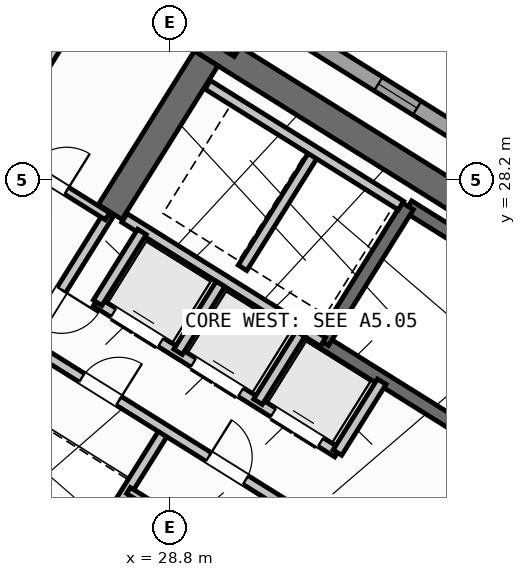
"""IFC4 building model, lengths in metres.
Left out: names, types, materials, properties, quantities, classifications, styles, units other than length and angle.
Written with IfcOpenShell. Run it as: python <this file> out.ifc"""

import sys

from ifc_helpers import new_model, si_unit, direction, frame, frame_2d, origin, origin_2d, place, context, subcontext, project, spatial, rectangle, hollow_rectangle, extrude, source, transform, mapped, element, fill, save


model = new_model("IFC4")
c1 = context("Model", 3, precision=1e-05, world=origin(), true_north=direction((0.0, 1.0)))
c2 = subcontext(c1, "Body", "Model", "MODEL_VIEW")
j1 = project(units=[si_unit("LENGTHUNIT", "METRE"), si_unit("PLANEANGLEUNIT", "RADIAN")], contexts=[c1])
p1 = place(None, origin())
s1 = spatial("IfcSite", under=j1, at=p1, CompositionType="ELEMENT")
p2 = place(p1, origin())
s2 = spatial("IfcBuilding", under=s1, at=p2, CompositionType="ELEMENT")
p3 = place(p2, frame((0.0, 0.0, 147.9)))
s3 = spatial("IfcBuildingStorey", under=s2, at=p3, CompositionType="ELEMENT", Elevation=147.9)
p4 = place(p3, frame((40.573, 24.01, 0.0), z_axis=(0.0, 0.0, 1.0), x_axis=(-0.848047359947, 0.529920442413, 0.0)))
e1 = element("IfcWall", 1, at=p4, inside=s3, PredefinedType="SHEAR", context=c2, shape_type="SweptSolid", body=[
    extrude(rectangle(XDim=13.14, YDim=0.55, at=frame_2d((6.57, 0.0))), origin(), (0.0, 0.0, 1.0), 3.35),
])
p5 = place(p3, frame((29.517, 30.594, 0.0), z_axis=(0.0, 0.0, 1.0), x_axis=(-0.529906864564, -0.848055844204, 0.0)))
e2 = element("IfcWall", 2, at=p5, inside=s3, PredefinedType="SHEAR", context=c2, shape_type="SweptSolid", body=[
    extrude(rectangle(XDim=3.575, YDim=0.55, at=frame_2d((1.788, 0.0))), origin(), (0.0, 0.0, 1.0), 3.35),
])
m1 = source(origin(), c2, "Body", "SweptSolid", [
    extrude(hollow_rectangle(XDim=0.9, YDim=0.9, WallThickness=0.036, at=origin_2d()), origin(), (0.0, 0.0, 1.0), 3.6),
])
p6 = place(p3, frame((29.928, 31.251, 0.0), z_axis=(0.0, 0.0, 1.0), x_axis=(-0.848048096156, 0.529919264233, 0.0)))
e3 = element("IfcColumn", 3, at=p6, inside=s3, PredefinedType="COLUMN", context=c2, shape_type="MappedRepresentation", body=[
    mapped(m1, transform((0.0, 0.0, 0.0), scale=1.0)),
])
p7 = place(p3, frame((29.268, 6.429, 0.0), z_axis=(0.0, 0.0, 1.0), x_axis=(-0.848049971435, 0.529916263149, 0.0)))
e4 = element("IfcWall", 4, at=p7, inside=s3, PredefinedType="STANDARD", context=c2, shape_type="SweptSolid", body=[
    extrude(rectangle(XDim=31.588, YDim=0.32, at=frame_2d((15.794, 0.0))), origin(), (0.0, 0.0, 1.0), 3.35),
])
p8 = place(p7, frame((16.362, 0.0, 0.0)))
e5 = element("IfcOpeningElement", 5, at=p8, cuts=e4, PredefinedType="OPENING", context=c2, shape_type="SweptSolid", body=[
    extrude(rectangle(XDim=1.2, YDim=2.15, at=frame_2d((0.6, 1.075))), frame((0.0, 0.17, 0.0), z_axis=(0.0, -1.0, 0.0), x_axis=(1.0, 0.0, 0.0)), (0.0, 0.0, 1.0), 0.34),
])
p9 = place(p7, frame((2.989, 0.0, 0.8)))
e6 = element("IfcOpeningElement", 6, at=p9, cuts=e4, PredefinedType="OPENING", context=c2, shape_type="SweptSolid", body=[
    extrude(rectangle(XDim=2.1, YDim=1.55, at=frame_2d((1.05, 0.775))), frame((0.0, 0.17, 0.0), z_axis=(0.0, -1.0, 0.0), x_axis=(1.0, 0.0, 0.0)), (0.0, 0.0, 1.0), 0.34),
])
p10 = place(p7, frame((8.359, 0.0, 0.8)))
e7 = element("IfcOpeningElement", 7, at=p10, cuts=e4, PredefinedType="OPENING", context=c2, shape_type="SweptSolid", body=[
    extrude(rectangle(XDim=2.1, YDim=1.55, at=frame_2d((1.05, 0.775))), frame((0.0, 0.17, 0.0), z_axis=(0.0, -1.0, 0.0), x_axis=(1.0, 0.0, 0.0)), (0.0, 0.0, 1.0), 0.34),
])
p11 = place(p7, frame((13.284, 0.0, 0.95)))
e8 = element("IfcOpeningElement", 8, at=p11, cuts=e4, PredefinedType="OPENING", context=c2, shape_type="SweptSolid", body=[
    extrude(rectangle(XDim=1.2, YDim=1.4, at=frame_2d((0.6, 0.7))), frame((0.0, 0.17, 0.0), z_axis=(0.0, -1.0, 0.0), x_axis=(1.0, 0.0, 0.0)), (0.0, 0.0, 1.0), 0.34),
])
p12 = place(p7, frame((29.188, 0.0, 0.95)))
e9 = element("IfcOpeningElement", 9, at=p12, cuts=e4, PredefinedType="OPENING", context=c2, shape_type="SweptSolid", body=[
    extrude(rectangle(XDim=1.2, YDim=1.4, at=frame_2d((0.6, 0.7))), frame((0.0, 0.17, 0.0), z_axis=(0.0, -1.0, 0.0), x_axis=(1.0, 0.0, 0.0)), (0.0, 0.0, 1.0), 0.34),
])
p13 = place(p7, frame((19.674, 0.0, 1.0)))
e10 = element("IfcOpeningElement", 10, at=p13, cuts=e4, PredefinedType="OPENING", context=c2, shape_type="SweptSolid", body=[
    extrude(rectangle(XDim=0.9, YDim=1.25, at=frame_2d((0.45, 0.625))), frame((0.0, 0.17, 0.0), z_axis=(0.0, -1.0, 0.0), x_axis=(1.0, 0.0, 0.0)), (0.0, 0.0, 1.0), 0.34),
])
p14 = place(p7, frame((21.896, 0.0, 1.0)))
e11 = element("IfcOpeningElement", 11, at=p14, cuts=e4, PredefinedType="OPENING", context=c2, shape_type="SweptSolid", body=[
    extrude(rectangle(XDim=0.9, YDim=1.25, at=frame_2d((0.45, 0.625))), frame((0.0, 0.17, 0.0), z_axis=(0.0, -1.0, 0.0), x_axis=(1.0, 0.0, 0.0)), (0.0, 0.0, 1.0), 0.34),
])
p15 = place(p7, frame((24.106, 0.0, 1.0)))
e12 = element("IfcOpeningElement", 12, at=p15, cuts=e4, PredefinedType="OPENING", context=c2, shape_type="SweptSolid", body=[
    extrude(rectangle(XDim=0.65, YDim=1.15, at=frame_2d((0.325, 0.575))), frame((0.0, 0.17, 0.0), z_axis=(0.0, -1.0, 0.0), x_axis=(1.0, 0.0, 0.0)), (0.0, 0.0, 1.0), 0.34),
])
p16 = place(p7, frame((26.366, 0.0, 1.0)))
e13 = element("IfcOpeningElement", 13, at=p16, cuts=e4, PredefinedType="OPENING", context=c2, shape_type="SweptSolid", body=[
    extrude(rectangle(XDim=0.9, YDim=1.25, at=frame_2d((0.45, 0.625))), frame((0.0, 0.17, 0.0), z_axis=(0.0, -1.0, 0.0), x_axis=(1.0, 0.0, 0.0)), (0.0, 0.0, 1.0), 0.34),
])
p17 = place(p3, frame((14.138, 41.825, 0.0), z_axis=(0.0, 0.0, 1.0), x_axis=(0.848046498049, -0.529921821731, 0.0)))
e14 = element("IfcWall", 14, at=p17, inside=s3, PredefinedType="STANDARD", context=c2, shape_type="SweptSolid", body=[
    extrude(rectangle(XDim=31.588, YDim=0.32, at=frame_2d((15.794, 0.0))), origin(), (0.0, 0.0, 1.0), 3.35),
])
p18 = place(p17, frame((2.949, 0.0, 0.0)))
e15 = element("IfcOpeningElement", 15, at=p18, cuts=e14, PredefinedType="OPENING", context=c2, shape_type="SweptSolid", body=[
    extrude(rectangle(XDim=1.05, YDim=2.15, at=frame_2d((0.525, 1.075))), frame((0.0, 0.17, 0.0), z_axis=(0.0, -1.0, 0.0), x_axis=(1.0, 0.0, 0.0)), (0.0, 0.0, 1.0), 0.34),
])
p19 = place(p17, frame((0.861, 0.0, 0.85)))
e16 = element("IfcOpeningElement", 16, at=p19, cuts=e14, PredefinedType="OPENING", context=c2, shape_type="SweptSolid", body=[
    extrude(rectangle(XDim=1.5, YDim=1.5, at=frame_2d((0.75, 0.75))), frame((0.0, 0.17, 0.0), z_axis=(0.0, -1.0, 0.0), x_axis=(1.0, 0.0, 0.0)), (0.0, 0.0, 1.0), 0.34),
])
p20 = place(p17, frame((8.494, 0.0, 0.85)))
e17 = element("IfcOpeningElement", 17, at=p20, cuts=e14, PredefinedType="OPENING", context=c2, shape_type="SweptSolid", body=[
    extrude(rectangle(XDim=1.8, YDim=1.5, at=frame_2d((0.9, 0.75))), frame((0.0, 0.17, 0.0), z_axis=(0.0, -1.0, 0.0), x_axis=(1.0, 0.0, 0.0)), (0.0, 0.0, 1.0), 0.34),
])
p21 = place(p17, frame((13.874, 0.0, 0.85)))
e18 = element("IfcOpeningElement", 18, at=p21, cuts=e14, PredefinedType="OPENING", context=c2, shape_type="SweptSolid", body=[
    extrude(rectangle(XDim=1.5, YDim=1.5, at=frame_2d((0.75, 0.75))), frame((0.0, 0.17, 0.0), z_axis=(0.0, -1.0, 0.0), x_axis=(1.0, 0.0, 0.0)), (0.0, 0.0, 1.0), 0.34),
])
p22 = place(p17, frame((17.104, 0.0, 1.0)))
e19 = element("IfcOpeningElement", 19, at=p22, cuts=e14, PredefinedType="OPENING", context=c2, shape_type="SweptSolid", body=[
    extrude(rectangle(XDim=0.9, YDim=1.25, at=frame_2d((0.45, 0.625))), frame((0.0, 0.17, 0.0), z_axis=(0.0, -1.0, 0.0), x_axis=(1.0, 0.0, 0.0)), (0.0, 0.0, 1.0), 0.34),
])
p23 = place(p17, frame((22.144, 0.0, 1.0)))
e20 = element("IfcOpeningElement", 20, at=p23, cuts=e14, PredefinedType="OPENING", context=c2, shape_type="SweptSolid", body=[
    extrude(rectangle(XDim=0.9, YDim=1.25, at=frame_2d((0.45, 0.625))), frame((0.0, 0.17, 0.0), z_axis=(0.0, -1.0, 0.0), x_axis=(1.0, 0.0, 0.0)), (0.0, 0.0, 1.0), 0.34),
])
p24 = place(p17, frame((27.744, 0.0, 1.0)))
e21 = element("IfcOpeningElement", 21, at=p24, cuts=e14, PredefinedType="OPENING", context=c2, shape_type="SweptSolid", body=[
    extrude(rectangle(XDim=0.9, YDim=1.25, at=frame_2d((0.45, 0.625))), frame((0.0, 0.17, 0.0), z_axis=(0.0, -1.0, 0.0), x_axis=(1.0, 0.0, 0.0)), (0.0, 0.0, 1.0), 0.34),
])
p25 = place(p3, frame((31.28, 18.261, 0.0), z_axis=(0.0, 0.0, 1.0), x_axis=(-0.848051618787, 0.529913626805, 0.0)))
e22 = element("IfcWall", 22, at=p25, inside=s3, PredefinedType="SHEAR", context=c2, shape_type="SweptSolid", body=[
    extrude(rectangle(XDim=7.46, YDim=0.26, at=frame_2d((3.73, 0.0))), origin(), (0.0, 0.0, 1.0), 3.35),
])
p26 = place(p25, frame((0.36, 0.0, 0.0)))
e23 = element("IfcOpeningElement", 23, at=p26, cuts=e22, PredefinedType="OPENING", context=c2, shape_type="SweptSolid", body=[
    extrude(rectangle(XDim=0.86, YDim=2.05, at=frame_2d((0.43, 1.025))), frame((0.0, 0.14, 0.0), z_axis=(0.0, -1.0, 0.0), x_axis=(1.0, 0.0, 0.0)), (0.0, 0.0, 1.0), 0.28),
])
p27 = place(p3, frame((39.721, 23.788, 0.0), z_axis=(0.0, 0.0, 1.0), x_axis=(-0.848054434086, 0.529909121291, 0.0)))
e24 = element("IfcWall", 24, at=p27, inside=s3, PredefinedType="SHEAR", context=c2, shape_type="SweptSolid", body=[
    extrude(rectangle(XDim=7.33, YDim=0.26, at=frame_2d((3.665, 0.0))), origin(), (0.0, 0.0, 1.0), 3.35),
])
p28 = place(p3, frame((38.046, 21.108, 0.0), z_axis=(0.0, 0.0, 1.0), x_axis=(-0.848054434086, 0.529909121291, 0.0)))
e25 = element("IfcWall", 25, at=p28, inside=s3, PredefinedType="SHEAR", context=c2, shape_type="SweptSolid", body=[
    extrude(rectangle(XDim=7.33, YDim=0.26, at=frame_2d((3.665, 0.0))), origin(), (0.0, 0.0, 1.0), 3.35),
])
p29 = place(p28, frame((0.22, 0.0, 0.0)))
e26 = element("IfcOpeningElement", 26, at=p29, cuts=e25, PredefinedType="OPENING", context=c2, shape_type="SweptSolid", body=[
    extrude(rectangle(XDim=1.1, YDim=2.1, at=frame_2d((0.55, 1.05))), frame((0.0, 0.14, 0.0), z_axis=(0.0, -1.0, 0.0), x_axis=(1.0, 0.0, 0.0)), (0.0, 0.0, 1.0), 0.28),
])
p30 = place(p3, frame((33.496, 27.677, 0.0), z_axis=(0.0, 0.0, 1.0), x_axis=(-0.529908658664, -0.84805472316, 0.0)))
e27 = element("IfcWall", 27, at=p30, inside=s3, PredefinedType="SHEAR", context=c2, shape_type="SweptSolid", body=[
    extrude(rectangle(XDim=3.16, YDim=0.26, at=frame_2d((1.58, 0.0))), origin(), (0.0, 0.0, 1.0), 3.35),
])
p31 = place(p3, frame((31.822, 24.998, 0.0), z_axis=(0.0, 0.0, 1.0), x_axis=(-0.848036912365, 0.52993716162, 0.0)))
e28 = element("IfcWall", 28, at=p31, inside=s3, PredefinedType="STANDARD", context=c2, shape_type="SweptSolid", body=[
    extrude(rectangle(XDim=4.618, YDim=0.2, at=frame_2d((2.309, 0.0))), origin(), (0.0, 0.0, 1.0), 3.34),
])
p32 = place(p3, frame((32.108, 22.814, 0.0), z_axis=(0.0, 0.0, 1.0), x_axis=(-0.848042229521, 0.529928652696, 0.0)))
e29 = element("IfcWall", 29, at=p32, inside=s3, PredefinedType="STANDARD", context=c2, shape_type="SweptSolid", body=[
    extrude(rectangle(XDim=5.62, YDim=0.2, at=frame_2d((2.81, 0.0))), origin(), (0.0, 0.0, 1.0), 3.34),
])
p33 = place(p32, frame((0.39, 0.0, 0.0)))
e30 = element("IfcOpeningElement", 30, at=p33, cuts=e29, PredefinedType="OPENING", context=c2, shape_type="SweptSolid", body=[
    extrude(rectangle(XDim=1.1, YDim=2.15, at=frame_2d((0.55, 1.075))), frame((0.0, 0.11, 0.0), z_axis=(0.0, -1.0, 0.0), x_axis=(1.0, 0.0, 0.0)), (0.0, 0.0, 1.0), 0.22),
])
p34 = place(p32, frame((2.25, 0.0, 0.0)))
e31 = element("IfcOpeningElement", 31, at=p34, cuts=e29, PredefinedType="OPENING", context=c2, shape_type="SweptSolid", body=[
    extrude(rectangle(XDim=1.1, YDim=2.15, at=frame_2d((0.55, 1.075))), frame((0.0, 0.11, 0.0), z_axis=(0.0, -1.0, 0.0), x_axis=(1.0, 0.0, 0.0)), (0.0, 0.0, 1.0), 0.22),
])
p35 = place(p32, frame((4.11, 0.0, 0.0)))
e32 = element("IfcOpeningElement", 32, at=p35, cuts=e29, PredefinedType="OPENING", context=c2, shape_type="SweptSolid", body=[
    extrude(rectangle(XDim=1.1, YDim=2.15, at=frame_2d((0.55, 1.075))), frame((0.0, 0.11, 0.0), z_axis=(0.0, -1.0, 0.0), x_axis=(1.0, 0.0, 0.0)), (0.0, 0.0, 1.0), 0.22),
])
p36 = place(p3, frame((32.982, 24.213, 0.0), z_axis=(0.0, 0.0, 1.0), x_axis=(-0.529839334948, -0.84809803628, 0.0)))
e33 = element("IfcWall", 33, at=p36, inside=s3, PredefinedType="STANDARD", context=c2, shape_type="SweptSolid", body=[
    extrude(rectangle(XDim=1.65, YDim=0.2, at=frame_2d((0.825, 0.0))), origin(), (0.0, 0.0, 1.0), 3.34),
])
p37 = place(p3, frame((28.25, 27.17, 0.0), z_axis=(0.0, 0.0, 1.0), x_axis=(-0.529905827651, -0.848056492117, 0.0)))
e34 = element("IfcWall", 34, at=p37, inside=s3, PredefinedType="STANDARD", context=c2, shape_type="SweptSolid", body=[
    extrude(rectangle(XDim=1.65, YDim=0.2, at=frame_2d((0.825, 0.0))), origin(), (0.0, 0.0, 1.0), 3.34),
])
p38 = place(p3, frame((31.645, 28.716, 0.0), z_axis=(0.0, 0.0, 1.0), x_axis=(-0.52986693015, -0.848080795876, 0.0)))
e35 = element("IfcWall", 35, at=p38, inside=s3, PredefinedType="STANDARD", context=c2, shape_type="SweptSolid", body=[
    extrude(rectangle(XDim=2.66, YDim=0.2, at=frame_2d((1.33, 0.0))), origin(), (0.0, 0.0, 1.0), 3.34),
])
p39 = place(p3, frame((33.363, 27.69, 0.0), z_axis=(0.0, 0.0, 1.0), x_axis=(-0.848047090064, 0.529920874315, 0.0)))
e36 = element("IfcWall", 36, at=p39, inside=s3, PredefinedType="STANDARD", context=c2, shape_type="SweptSolid", body=[
    extrude(rectangle(XDim=4.498, YDim=0.2, at=frame_2d((2.249, 0.0))), origin(), (0.0, 0.0, 1.0), 3.34),
])
for number, where, z_axis, x_axis in (
    (37, (31.379, 25.156, 0.0), (0.0, 0.0, 1.0), (-0.53, -0.848, 0.0)),
    (38, (29.801, 26.142, 0.0), (0.0, 0.0, 1.0), (-0.53, -0.848, 0.0)),
):
    element("IfcWall", number, at=place(p3, frame(where, z_axis=z_axis, x_axis=x_axis)), inside=s3, PredefinedType="STANDARD", context=c2, shape_type="SweptSolid", body=[
        extrude(rectangle(XDim=1.58, YDim=0.2, at=frame_2d((0.79, 0.0))), origin(), (0.0, 0.0, 1.0), 3.34),
    ])
p40 = place(p3, frame((28.71, 23.263, 0.0), z_axis=(0.0, 0.0, 1.0), x_axis=(-0.529907497854, -0.848055448493, 0.0)))
e39 = element("IfcWall", 39, at=p40, inside=s3, PredefinedType="STANDARD", context=c2, shape_type="SweptSolid", body=[
    extrude(rectangle(XDim=2.88, YDim=0.2, at=frame_2d((1.44, 0.0))), origin(), (0.0, 0.0, 1.0), 3.34),
])
p41 = place(p3, frame((31.525, 21.504, 0.0), z_axis=(0.0, 0.0, 1.0), x_axis=(-0.848040211232, 0.529931882541, 0.0)))
e40 = element("IfcWall", 40, at=p41, inside=s3, PredefinedType="STANDARD", context=c2, shape_type="SweptSolid", body=[
    extrude(rectangle(XDim=6.218, YDim=0.2, at=frame_2d((3.109, 0.0))), origin(), (0.0, 0.0, 1.0), 3.34),
])
p42 = place(p41, frame((4.4, 0.0, 0.0)))
e41 = element("IfcOpeningElement", 41, at=p42, cuts=e40, PredefinedType="OPENING", context=c2, shape_type="SweptSolid", body=[
    extrude(rectangle(XDim=0.86, YDim=2.05, at=frame_2d((0.43, 1.025))), frame((0.0, 0.11, 0.0), z_axis=(0.0, -1.0, 0.0), x_axis=(1.0, 0.0, 0.0)), (0.0, 0.0, 1.0), 0.22),
])
p43 = place(p41, frame((1.45, 0.0, 0.0)))
e42 = element("IfcOpeningElement", 42, at=p43, cuts=e40, PredefinedType="OPENING", context=c2, shape_type="SweptSolid", body=[
    extrude(rectangle(XDim=0.86, YDim=2.05, at=frame_2d((0.43, 1.025))), frame((0.0, 0.11, 0.0), z_axis=(0.0, -1.0, 0.0), x_axis=(1.0, 0.0, 0.0)), (0.0, 0.0, 1.0), 0.22),
])
p44 = place(p3, frame((30.766, 20.327, 0.0), z_axis=(0.0, 0.0, 1.0), x_axis=(-0.848052663127, 0.529911955482, 0.0)))
e43 = element("IfcWall", 43, at=p44, inside=s3, PredefinedType="PLUMBINGWALL", context=c2, shape_type="SweptSolid", body=[
    extrude(rectangle(XDim=3.28, YDim=0.14, at=frame_2d((1.64, 0.0))), origin(), (0.0, 0.0, 1.0), 3.34),
])
p45 = place(p44, frame((1.2, 0.0, 0.0)))
e44 = element("IfcOpeningElement", 44, at=p45, cuts=e43, PredefinedType="OPENING", context=c2, shape_type="SweptSolid", body=[
    extrude(rectangle(XDim=0.78, YDim=2.05, at=frame_2d((0.39, 1.025))), frame((0.0, 0.08, 0.0), z_axis=(0.0, -1.0, 0.0), x_axis=(1.0, 0.0, 0.0)), (0.0, 0.0, 1.0), 0.16),
])
p46 = place(p3, frame((27.596, 27.52, 0.0), z_axis=(0.0, 0.0, 1.0), x_axis=(-0.529865479138, -0.848081702443, 0.0)))
e45 = element("IfcWall", 45, at=p46, inside=s3, PredefinedType="STANDARD", context=c2, shape_type="SweptSolid", body=[
    extrude(rectangle(XDim=2.96, YDim=0.2, at=frame_2d((1.48, 0.0))), origin(), (0.0, 0.0, 1.0), 3.34),
])
p47 = place(p46, frame((1.76, 0.0, 0.0)))
e46 = element("IfcOpeningElement", 46, at=p47, cuts=e45, PredefinedType="OPENING", context=c2, shape_type="SweptSolid", body=[
    extrude(rectangle(XDim=0.86, YDim=2.05, at=frame_2d((0.43, 1.025))), frame((0.0, 0.11, 0.0), z_axis=(0.0, -1.0, 0.0), x_axis=(1.0, 0.0, 0.0)), (0.0, 0.0, 1.0), 0.22),
])
p48 = place(p3, frame((27.57, 27.478, 0.0), z_axis=(0.0, 0.0, 1.0), x_axis=(-0.848050851465, 0.529914854792, 0.0)))
e47 = element("IfcWall", 47, at=p48, inside=s3, PredefinedType="PARTITIONING", context=c2, shape_type="SweptSolid", body=[
    extrude(rectangle(XDim=2.61, YDim=0.16, at=frame_2d((1.305, 0.0))), origin(), (0.0, 0.0, 1.0), 3.34),
])
p49 = place(p48, frame((0.95, 0.0, 0.0)))
e48 = element("IfcOpeningElement", 48, at=p49, cuts=e47, PredefinedType="OPENING", context=c2, shape_type="SweptSolid", body=[
    extrude(rectangle(XDim=0.86, YDim=2.05, at=frame_2d((0.43, 1.025))), frame((0.0, 0.09, 0.0), z_axis=(0.0, -1.0, 0.0), x_axis=(1.0, 0.0, 0.0)), (0.0, 0.0, 1.0), 0.18),
])
p50 = place(p3, frame((27.953, 33.016, 0.0), z_axis=(0.0, 0.0, 1.0), x_axis=(-0.529903001606, -0.848058257957, 0.0)))
e49 = element("IfcWall", 49, at=p50, inside=s3, PredefinedType="PARTITIONING", context=c2, shape_type="SweptSolid", body=[
    extrude(rectangle(XDim=9.15, YDim=0.16, at=frame_2d((4.575, 0.0))), origin(), (0.0, 0.0, 1.0), 3.34),
])
m2 = source(origin(), c2, "Body", "SweptSolid", [
    extrude(rectangle(XDim=0.9, YDim=1.25, at=frame_2d((0.45, 0.625))), frame((0.0, 0.03, 0.0), z_axis=(0.0, -1.0, 0.0), x_axis=(1.0, 0.0, 0.0)), (0.0, 0.0, 1.0), 0.06),
])
p51 = place(p23, origin())
e50 = element("IfcWindow", 50, at=p51, inside=s3, PartitioningType="SINGLE_PANEL", PredefinedType="WINDOW", context=c2, shape_type="MappedRepresentation", body=[
    mapped(m2, transform((0.0, 0.0, 0.0), scale=1.0)),
])
fill(e20, e50)
m3 = source(origin(), c2, "Body", "SweptSolid", [
    extrude(rectangle(XDim=1.1, YDim=2.15, at=frame_2d((0.55, 1.075))), frame((0.0, 0.025, 0.0), z_axis=(0.0, -1.0, 0.0), x_axis=(1.0, 0.0, 0.0)), (0.0, 0.0, 1.0), 0.05),
])
p52 = place(p33, origin())
e51 = element("IfcDoor", 51, at=p52, inside=s3, OperationType="DOUBLE_DOOR_SLIDING", PredefinedType="DOOR", context=c2, shape_type="MappedRepresentation", body=[
    mapped(m3, transform((0.0, 0.0, 0.0), scale=1.0)),
])
fill(e30, e51)
p53 = place(p34, origin())
e52 = element("IfcDoor", 52, at=p53, inside=s3, OperationType="DOUBLE_DOOR_SLIDING", PredefinedType="DOOR", context=c2, shape_type="MappedRepresentation", body=[
    mapped(m3, transform((0.0, 0.0, 0.0), scale=1.0)),
])
fill(e31, e52)
p54 = place(p35, origin())
e53 = element("IfcDoor", 53, at=p54, inside=s3, OperationType="DOUBLE_DOOR_SLIDING", PredefinedType="DOOR", context=c2, shape_type="MappedRepresentation", body=[
    mapped(m3, transform((0.0, 0.0, 0.0), scale=1.0)),
])
fill(e32, e53)
m4 = source(origin(), c2, "Body", "SweptSolid", [
    extrude(rectangle(XDim=0.86, YDim=2.05, at=frame_2d((0.43, 1.025))), frame((0.0, 0.025, 0.0), z_axis=(0.0, -1.0, 0.0), x_axis=(1.0, 0.0, 0.0)), (0.0, 0.0, 1.0), 0.05),
])
p55 = place(p42, frame((0.86, 0.0, 0.0), z_axis=(0.0, 0.0, 1.0), x_axis=(-1.0, 0.0, 0.0)))
e54 = element("IfcDoor", 54, at=p55, inside=s3, OperationType="SINGLE_SWING_RIGHT", PredefinedType="DOOR", context=c2, shape_type="MappedRepresentation", body=[
    mapped(m4, transform((0.0, 0.0, 0.0), scale=1.0)),
])
fill(e41, e54)
p56 = place(p43, frame((0.86, 0.0, 0.0), z_axis=(0.0, 0.0, 1.0), x_axis=(-1.0, 0.0, 0.0)))
e55 = element("IfcDoor", 55, at=p56, inside=s3, OperationType="SINGLE_SWING_LEFT", PredefinedType="DOOR", context=c2, shape_type="MappedRepresentation", body=[
    mapped(m4, transform((0.0, 0.0, 0.0), scale=1.0)),
])
fill(e42, e55)
p57 = place(p49, frame((0.86, 0.0, 0.0), z_axis=(0.0, 0.0, 1.0), x_axis=(-1.0, 0.0, 0.0)))
e56 = element("IfcDoor", 56, at=p57, inside=s3, OperationType="SINGLE_SWING_RIGHT", PredefinedType="DOOR", context=c2, shape_type="MappedRepresentation", body=[
    mapped(m4, transform((0.0, 0.0, 0.0), scale=1.0)),
])
fill(e48, e56)
p58 = place(p47, origin())
e57 = element("IfcDoor", 57, at=p58, inside=s3, OperationType="SINGLE_SWING_LEFT", PredefinedType="DOOR", context=c2, shape_type="MappedRepresentation", body=[
    mapped(m4, transform((0.0, 0.0, 0.0), scale=1.0)),
])
fill(e46, e57)
save(model, sys.argv[1])
